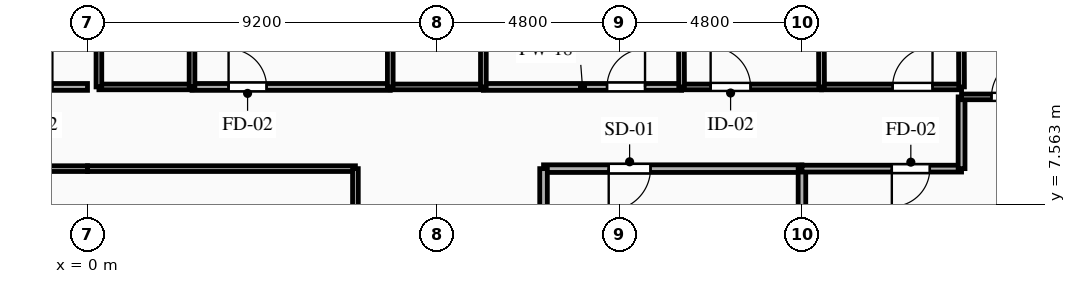
"""IFC4 building model, lengths in metres.
Left out: names, types, materials, properties, quantities, classifications, styles, units other than length and angle.
Written with IfcOpenShell. Run it as: python <this file> out.ifc"""

import sys

from ifc_helpers import new_model, si_unit, direction, frame, frame_2d, origin, place, context, subcontext, project, spatial, rectangle, extrude, element, fill, save


model = new_model("IFC4")
c1 = context("Model", 3, precision=1e-05, world=origin(), true_north=direction((0.0, 1.0)))
c2 = subcontext(c1, "Body", "Model", "MODEL_VIEW")
j1 = project(units=[si_unit("LENGTHUNIT", "METRE"), si_unit("PLANEANGLEUNIT", "RADIAN")], contexts=[c1])
p1 = place(None, origin())
s1 = spatial("IfcSite", under=j1, at=p1, CompositionType="ELEMENT")
p2 = place(p1, origin())
s2 = spatial("IfcBuilding", under=s1, at=p2, CompositionType="ELEMENT")
p3 = place(p2, frame((0.0, 0.0, 99.1)))
s3 = spatial("IfcBuildingStorey", under=s2, at=p3, CompositionType="ELEMENT", Elevation=99.1)
p4 = place(p3, frame((18.8, 8.5, 0.0), z_axis=(0.0, 0.0, 1.0), x_axis=(-1.0, 0.0, 0.0)))
e1 = element("IfcWall", 1, at=p4, inside=s3, PredefinedType="PARTITIONING", context=c2, shape_type="SweptSolid", body=[
    extrude(rectangle(XDim=6.8, YDim=0.2, at=frame_2d((3.4, 0.0))), origin(), (0.0, 0.0, 1.0), 3.045),
])
p5 = place(p4, frame((3.985, 0.0, 0.0)))
e2 = element("IfcOpeningElement", 2, at=p5, cuts=e1, PredefinedType="OPENING", context=c2, shape_type="SweptSolid", body=[
    extrude(rectangle(XDim=1.1, YDim=2.15, at=frame_2d((0.55, 1.075))), frame((0.0, 0.11, 0.0), z_axis=(0.0, -1.0, 0.0), x_axis=(1.0, 0.0, 0.0)), (0.0, 0.0, 1.0), 0.22),
])
p6 = place(p3, frame((12.0, 8.5, 0.0), z_axis=(0.0, 0.0, 1.0), x_axis=(0.0, -1.0, 0.0)))
e3 = element("IfcWall", 3, at=p6, inside=s3, PredefinedType="PARTITIONING", context=c2, shape_type="SweptSolid", body=[
    extrude(rectangle(XDim=2.9, YDim=0.2, at=frame_2d((1.45, 0.0))), origin(), (0.0, 0.0, 1.0), 3.045),
])
p7 = place(p3, frame((18.8, 5.6, 0.0), z_axis=(0.0, 0.0, 1.0), x_axis=(0.0, 1.0, 0.0)))
e4 = element("IfcWall", 4, at=p7, inside=s3, PredefinedType="PARTITIONING", context=c2, shape_type="SweptSolid", body=[
    extrude(rectangle(XDim=2.9, YDim=0.2, at=frame_2d((1.45, 0.0))), origin(), (0.0, 0.0, 1.0), 2.53),
])
p8 = place(p3, frame((-4.917, 10.65, 0.0), z_axis=(0.0, 0.0, 1.0), x_axis=(1.0, 0.0, 0.0)))
e5 = element("IfcWall", 5, at=p8, inside=s3, PredefinedType="PARTITIONING", context=c2, shape_type="SweptSolid", body=[
    extrude(rectangle(XDim=4.917, YDim=0.18, at=frame_2d((2.458, 0.0))), origin(), (0.0, 0.0, 1.0), 3.045),
])
p9 = place(p8, frame((2.992, 0.0, 0.0)))
e6 = element("IfcOpeningElement", 6, at=p9, cuts=e5, PredefinedType="OPENING", context=c2, shape_type="SweptSolid", body=[
    extrude(rectangle(XDim=1.0, YDim=2.15, at=frame_2d((0.5, 1.075))), frame((0.0, 0.1, 0.0), z_axis=(0.0, -1.0, 0.0), x_axis=(1.0, 0.0, 0.0)), (0.0, 0.0, 1.0), 0.2),
])
p10 = place(p3, frame((0.0, 8.5, 0.0), z_axis=(0.0, 0.0, 1.0), x_axis=(-1.0, 0.0, 0.0)))
e7 = element("IfcWall", 7, at=p10, inside=s3, PredefinedType="PARTITIONING", context=c2, shape_type="SweptSolid", body=[
    extrude(rectangle(XDim=7.05, YDim=0.15, at=frame_2d((3.525, 0.0))), origin(), (0.0, 0.0, 1.0), 3.045),
])
p11 = place(p10, frame((1.185, 0.0, 0.0)))
e8 = element("IfcOpeningElement", 8, at=p11, cuts=e7, PredefinedType="OPENING", context=c2, shape_type="SweptSolid", body=[
    extrude(rectangle(XDim=1.05, YDim=2.15, at=frame_2d((0.525, 1.075))), frame((0.0, 0.085, 0.0), z_axis=(0.0, -1.0, 0.0), x_axis=(1.0, 0.0, 0.0)), (0.0, 0.0, 1.0), 0.17),
])
p12 = place(p3, frame((23.0, 8.5, 0.0), z_axis=(0.0, 0.0, 1.0), x_axis=(-1.0, 0.0, 0.0)))
e9 = element("IfcWall", 9, at=p12, inside=s3, PredefinedType="PARTITIONING", context=c2, shape_type="SweptSolid", body=[
    extrude(rectangle(XDim=4.2, YDim=0.18, at=frame_2d((2.1, 0.0))), origin(), (0.0, 0.0, 1.0), 3.045),
])
p13 = place(p12, frame((0.835, 0.0, 0.0)))
e10 = element("IfcOpeningElement", 10, at=p13, cuts=e9, PredefinedType="OPENING", context=c2, shape_type="SweptSolid", body=[
    extrude(rectangle(XDim=1.0, YDim=2.15, at=frame_2d((0.5, 1.075))), frame((0.0, 0.1, 0.0), z_axis=(0.0, -1.0, 0.0), x_axis=(1.0, 0.0, 0.0)), (0.0, 0.0, 1.0), 0.2),
])
p14 = place(p3, frame((23.0, 10.388, 0.0), z_axis=(0.0, 0.0, 1.0), x_axis=(0.0, -1.0, 0.0)))
e11 = element("IfcWall", 11, at=p14, inside=s3, PredefinedType="PARTITIONING", context=c2, shape_type="SweptSolid", body=[
    extrude(rectangle(XDim=1.888, YDim=0.18, at=frame_2d((0.944, 0.0))), origin(), (0.0, 0.0, 1.0), 3.045),
])
p15 = place(p3, frame((2.75, 10.65, 0.0), z_axis=(0.0, 0.0, 1.0), x_axis=(1.0, 0.0, 0.0)))
e12 = element("IfcWall", 12, at=p15, inside=s3, PredefinedType="PARTITIONING", context=c2, shape_type="SweptSolid", body=[
    extrude(rectangle(XDim=5.217, YDim=0.18, at=frame_2d((2.608, 0.0))), origin(), (0.0, 0.0, 1.0), 3.045),
])
p16 = place(p15, frame((0.962, 0.0, 0.0)))
e13 = element("IfcOpeningElement", 13, at=p16, cuts=e12, PredefinedType="OPENING", context=c2, shape_type="SweptSolid", body=[
    extrude(rectangle(XDim=1.0, YDim=2.15, at=frame_2d((0.5, 1.075))), frame((0.0, 0.1, 0.0), z_axis=(0.0, -1.0, 0.0), x_axis=(1.0, 0.0, 0.0)), (0.0, 0.0, 1.0), 0.2),
])
p17 = place(p3, frame((0.3, 10.65, 0.0), z_axis=(0.0, 0.0, 1.0), x_axis=(1.0, 0.0, 0.0)))
e14 = element("IfcWall", 14, at=p17, inside=s3, PredefinedType="PLUMBINGWALL", context=c2, shape_type="SweptSolid", body=[
    extrude(rectangle(XDim=2.45, YDim=0.15, at=frame_2d((1.225, 0.0))), origin(), (0.0, 0.0, 1.0), 3.045),
])
p18 = place(p3, frame((10.417, 10.65, 0.0), z_axis=(0.0, 0.0, 1.0), x_axis=(1.0, 0.0, 0.0)))
e15 = element("IfcWall", 15, at=p18, inside=s3, PredefinedType="PARTITIONING", context=c2, shape_type="SweptSolid", body=[
    extrude(rectangle(XDim=5.216, YDim=0.18, at=frame_2d((2.608, 0.0))), origin(), (0.0, 0.0, 1.0), 3.045),
])
p19 = place(p18, frame((3.254, 0.0, 0.0)))
e16 = element("IfcOpeningElement", 16, at=p19, cuts=e15, PredefinedType="OPENING", context=c2, shape_type="SweptSolid", body=[
    extrude(rectangle(XDim=1.0, YDim=2.15, at=frame_2d((0.5, 1.075))), frame((0.0, 0.1, 0.0), z_axis=(0.0, -1.0, 0.0), x_axis=(1.0, 0.0, 0.0)), (0.0, 0.0, 1.0), 0.2),
])
p20 = place(p3, frame((7.967, 10.65, 0.0), z_axis=(0.0, 0.0, 1.0), x_axis=(1.0, 0.0, 0.0)))
e17 = element("IfcWall", 17, at=p20, inside=s3, PredefinedType="PLUMBINGWALL", context=c2, shape_type="SweptSolid", body=[
    extrude(rectangle(XDim=2.45, YDim=0.15, at=frame_2d((1.225, 0.0))), origin(), (0.0, 0.0, 1.0), 3.045),
])
p21 = place(p3, frame((15.633, 10.65, 0.0), z_axis=(0.0, 0.0, 1.0), x_axis=(1.0, 0.0, 0.0)))
e18 = element("IfcWall", 18, at=p21, inside=s3, PredefinedType="PARTITIONING", context=c2, shape_type="SweptSolid", body=[
    extrude(rectangle(XDim=3.683, YDim=0.15, at=frame_2d((1.842, 0.0))), origin(), (0.0, 0.0, 1.0), 3.045),
])
p22 = place(p21, frame((0.764, 0.0, 0.0)))
e19 = element("IfcOpeningElement", 19, at=p22, cuts=e18, PredefinedType="OPENING", context=c2, shape_type="SweptSolid", body=[
    extrude(rectangle(XDim=1.05, YDim=2.15, at=frame_2d((0.525, 1.075))), frame((0.0, 0.085, 0.0), z_axis=(0.0, -1.0, 0.0), x_axis=(1.0, 0.0, 0.0)), (0.0, 0.0, 1.0), 0.17),
])
p23 = place(p3, frame((19.316, 10.65, 0.0), z_axis=(0.0, 0.0, 1.0), x_axis=(1.0, 0.0, 0.0)))
e20 = element("IfcWall", 20, at=p23, inside=s3, PredefinedType="PARTITIONING", context=c2, shape_type="SweptSolid", body=[
    extrude(rectangle(XDim=3.684, YDim=0.15, at=frame_2d((1.842, 0.0))), origin(), (0.0, 0.0, 1.0), 3.045),
])
p24 = place(p23, frame((1.869, 0.0, 0.0)))
e21 = element("IfcOpeningElement", 21, at=p24, cuts=e20, PredefinedType="OPENING", context=c2, shape_type="SweptSolid", body=[
    extrude(rectangle(XDim=1.05, YDim=2.15, at=frame_2d((0.525, 1.075))), frame((0.0, 0.085, 0.0), z_axis=(0.0, -1.0, 0.0), x_axis=(1.0, 0.0, 0.0)), (0.0, 0.0, 1.0), 0.17),
])
for number, where, z_axis, x_axis in (
    (22, (7.05, 8.5, 0.0), (0.0, 0.0, 1.0), (-1.0, 0.0, 0.0)),
    (23, (7.05, 1.45, 0.0), (0.0, 0.0, 1.0), (0.0, 1.0, 0.0)),
):
    element("IfcWall", number, at=place(p3, frame(where, z_axis=z_axis, x_axis=x_axis)), inside=s3, PredefinedType="PARTITIONING", context=c2, shape_type="SweptSolid", body=[
        extrude(rectangle(XDim=7.05, YDim=0.15, at=frame_2d((3.525, 0.0))), origin(), (0.0, 0.0, 1.0), 3.045),
    ])
p25 = place(p3, frame((23.0, 10.388, 0.0), z_axis=(0.0, 0.0, 1.0), x_axis=(1.0, 0.0, 0.0)))
e24 = element("IfcWall", 24, at=p25, inside=s3, PredefinedType="PARTITIONING", context=c2, shape_type="SweptSolid", body=[
    extrude(rectangle(XDim=3.871, YDim=0.15, at=frame_2d((1.936, 0.0))), origin(), (0.0, 0.0, 1.0), 3.045),
])
p26 = place(p25, frame((0.788, 0.0, 0.0)))
e25 = element("IfcOpeningElement", 25, at=p26, cuts=e24, PredefinedType="OPENING", context=c2, shape_type="SweptSolid", body=[
    extrude(rectangle(XDim=1.05, YDim=2.15, at=frame_2d((0.525, 1.075))), frame((0.0, 0.085, 0.0), z_axis=(0.0, -1.0, 0.0), x_axis=(1.0, 0.0, 0.0)), (0.0, 0.0, 1.0), 0.17),
])
p27 = place(p3, frame((23.0, 10.65, 0.0), z_axis=(0.0, 0.0, 1.0), x_axis=(-0.0036027147, 0.999993510202, 0.0)))
e26 = element("IfcWall", 26, at=p27, inside=s3, PredefinedType="PARTITIONING", context=c2, shape_type="SweptSolid", body=[
    extrude(rectangle(XDim=12.198, YDim=0.15, at=frame_2d((6.099, 0.0))), origin(), (0.0, 0.0, 1.0), 3.045),
])
for number, where, z_axis, x_axis in (
    (27, (0.3, 12.8, 0.0), (0.0, 0.0, 1.0), (0.0, -1.0, 0.0)),
    (28, (2.75, 10.65, 0.0), (0.0, 0.0, 1.0), (0.0, 1.0, 0.0)),
    (29, (7.967, 12.8, 0.0), (0.0, 0.0, 1.0), (0.0, -1.0, 0.0)),
    (30, (10.417, 10.65, 0.0), (0.0, 0.0, 1.0), (0.0, 1.0, 0.0)),
):
    element("IfcWall", number, at=place(p3, frame(where, z_axis=z_axis, x_axis=x_axis)), inside=s3, PredefinedType="PLUMBINGWALL", context=c2, shape_type="SweptSolid", body=[
        extrude(rectangle(XDim=2.15, YDim=0.15, at=frame_2d((1.075, 0.0))), origin(), (0.0, 0.0, 1.0), 3.045),
    ])
p28 = place(p3, frame((15.589, 22.073, 0.0), z_axis=(0.0, 0.0, 1.0), x_axis=(0.003846947384, -0.999992600471, 0.0)))
e31 = element("IfcWall", 31, at=p28, inside=s3, PredefinedType="PARTITIONING", context=c2, shape_type="SweptSolid", body=[
    extrude(rectangle(XDim=11.423, YDim=0.15, at=frame_2d((5.712, 0.0))), origin(), (0.0, 0.0, 1.0), 3.045),
])
p29 = place(p3, frame((19.273, 22.46, 0.0), z_axis=(0.0, 0.0, 1.0), x_axis=(0.003700156578, -0.999993154397, 0.0)))
e32 = element("IfcWall", 32, at=p29, inside=s3, PredefinedType="PARTITIONING", context=c2, shape_type="SweptSolid", body=[
    extrude(rectangle(XDim=11.811, YDim=0.15, at=frame_2d((5.905, 0.0))), origin(), (0.0, 0.0, 1.0), 3.045),
])
p30 = place(p5, origin())
e33 = element("IfcDoor", 33, at=p30, inside=s3, OperationType="SINGLE_SWING_RIGHT", PredefinedType="DOOR", context=c2, shape_type="SweptSolid", body=[
    extrude(rectangle(XDim=1.1, YDim=2.15, at=frame_2d((0.55, 1.075))), frame((0.0, 0.025, 0.0), z_axis=(0.0, -1.0, 0.0), x_axis=(1.0, 0.0, 0.0)), (0.0, 0.0, 1.0), 0.05),
])
fill(e2, e33)
p31 = place(p9, origin())
e34 = element("IfcDoor", 34, at=p31, inside=s3, OperationType="SINGLE_SWING_RIGHT", PredefinedType="DOOR", context=c2, shape_type="SweptSolid", body=[
    extrude(rectangle(XDim=1.0, YDim=2.15, at=frame_2d((0.5, 1.075))), frame((0.0, 0.025, 0.0), z_axis=(0.0, -1.0, 0.0), x_axis=(1.0, 0.0, 0.0)), (0.0, 0.0, 1.0), 0.05),
])
fill(e6, e34)
p32 = place(p13, origin())
e35 = element("IfcDoor", 35, at=p32, inside=s3, OperationType="SINGLE_SWING_RIGHT", PredefinedType="DOOR", context=c2, shape_type="SweptSolid", body=[
    extrude(rectangle(XDim=1.0, YDim=2.15, at=frame_2d((0.5, 1.075))), frame((0.0, 0.025, 0.0), z_axis=(0.0, -1.0, 0.0), x_axis=(1.0, 0.0, 0.0)), (0.0, 0.0, 1.0), 0.05),
])
fill(e10, e35)
p33 = place(p16, origin())
e36 = element("IfcDoor", 36, at=p33, inside=s3, OperationType="SINGLE_SWING_LEFT", PredefinedType="DOOR", context=c2, shape_type="SweptSolid", body=[
    extrude(rectangle(XDim=1.0, YDim=2.15, at=frame_2d((0.5, 1.075))), frame((0.0, 0.025, 0.0), z_axis=(0.0, -1.0, 0.0), x_axis=(1.0, 0.0, 0.0)), (0.0, 0.0, 1.0), 0.05),
])
fill(e13, e36)
p34 = place(p19, origin())
e37 = element("IfcDoor", 37, at=p34, inside=s3, OperationType="SINGLE_SWING_RIGHT", PredefinedType="DOOR", context=c2, shape_type="SweptSolid", body=[
    extrude(rectangle(XDim=1.0, YDim=2.15, at=frame_2d((0.5, 1.075))), frame((0.0, 0.025, 0.0), z_axis=(0.0, -1.0, 0.0), x_axis=(1.0, 0.0, 0.0)), (0.0, 0.0, 1.0), 0.05),
])
fill(e16, e37)
p35 = place(p22, origin())
e38 = element("IfcDoor", 38, at=p35, inside=s3, OperationType="SINGLE_SWING_LEFT", PredefinedType="DOOR", context=c2, shape_type="SweptSolid", body=[
    extrude(rectangle(XDim=1.05, YDim=2.15, at=frame_2d((0.525, 1.075))), frame((0.0, 0.025, 0.0), z_axis=(0.0, -1.0, 0.0), x_axis=(1.0, 0.0, 0.0)), (0.0, 0.0, 1.0), 0.05),
])
fill(e19, e38)
p36 = place(p24, origin())
e39 = element("IfcDoor", 39, at=p36, inside=s3, OperationType="SINGLE_SWING_RIGHT", PredefinedType="DOOR", context=c2, shape_type="SweptSolid", body=[
    extrude(rectangle(XDim=1.05, YDim=2.15, at=frame_2d((0.525, 1.075))), frame((0.0, 0.025, 0.0), z_axis=(0.0, -1.0, 0.0), x_axis=(1.0, 0.0, 0.0)), (0.0, 0.0, 1.0), 0.05),
])
fill(e21, e39)
p37 = place(p26, origin())
e40 = element("IfcDoor", 40, at=p37, inside=s3, OperationType="SINGLE_SWING_RIGHT", PredefinedType="DOOR", context=c2, shape_type="SweptSolid", body=[
    extrude(rectangle(XDim=1.05, YDim=2.15, at=frame_2d((0.525, 1.075))), frame((0.0, 0.025, 0.0), z_axis=(0.0, -1.0, 0.0), x_axis=(1.0, 0.0, 0.0)), (0.0, 0.0, 1.0), 0.05),
])
fill(e25, e40)
save(model, sys.argv[1])
